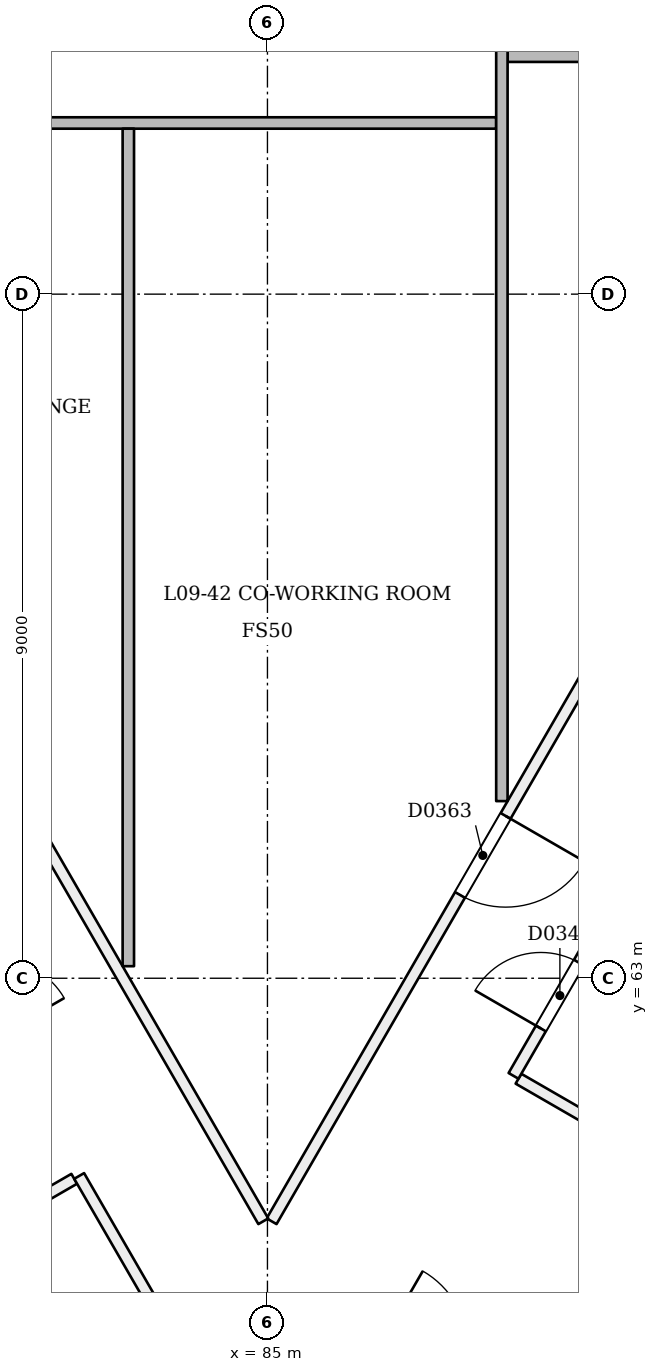
"""IFC4 building model, lengths in metres.
Left out: names, types, materials, properties, quantities, classifications, styles, units other than length and angle.
Written with IfcOpenShell. Run it as: python <this file> out.ifc"""

import sys

from ifc_helpers import new_model, si_unit, direction, frame, frame_2d, origin, place, context, subcontext, project, spatial, rectangle, extrude, element, fill, save


model = new_model("IFC4")
c1 = context("Model", 3, precision=1e-05, world=origin(), true_north=direction((0.0, 1.0)))
c2 = subcontext(c1, "Body", "Model", "MODEL_VIEW")
j1 = project(units=[si_unit("LENGTHUNIT", "METRE"), si_unit("PLANEANGLEUNIT", "RADIAN")], contexts=[c1])
p1 = place(None, origin())
s1 = spatial("IfcSite", under=j1, at=p1, CompositionType="ELEMENT")
p2 = place(p1, origin())
s2 = spatial("IfcBuilding", under=s1, at=p2, CompositionType="ELEMENT")
p3 = place(p2, frame((0.0, 0.0, 41.4)))
s3 = spatial("IfcBuildingStorey", under=s2, at=p3, CompositionType="ELEMENT", Elevation=41.4)
p4 = place(p3, frame((81.033, 59.539, 0.0), z_axis=(0.0, 0.0, 1.0), x_axis=(0.866052144996, 0.499953680002, 0.0)))
e1 = element("IfcWall", 1, at=p4, inside=s3, PredefinedType="PARTITIONING", context=c2, shape_type="SweptSolid", body=[
    extrude(rectangle(XDim=1.645, YDim=0.15, at=frame_2d((0.823, 0.0))), origin(), (0.0, 0.0, 1.0), 3.1),
])
p5 = place(p3, frame((82.523, 60.399, 0.0), z_axis=(0.0, 0.0, 1.0), x_axis=(0.500004234368, -0.866022959057, 0.0)))
e2 = element("IfcWall", 2, at=p5, inside=s3, PredefinedType="PARTITIONING", context=c2, shape_type="SweptSolid", body=[
    extrude(rectangle(XDim=2.5, YDim=0.15, at=frame_2d((1.25, 0.0))), origin(), (0.0, 0.0, 1.0), 3.1),
])
p6 = place(p3, frame((89.692, 60.876, 0.0), z_axis=(0.0, 0.0, 1.0), x_axis=(-0.866053882819, 0.499950669621, 0.0)))
e3 = element("IfcWall", 3, at=p6, inside=s3, PredefinedType="PARTITIONING", context=c2, shape_type="SweptSolid", body=[
    extrude(rectangle(XDim=1.605, YDim=0.15, at=frame_2d((0.803, 0.0))), origin(), (0.0, 0.0, 1.0), 3.1),
])
p7 = place(p3, frame((88.237, 61.716, 0.0), z_axis=(0.0, 0.0, 1.0), x_axis=(0.500002225217, 0.866024119051, 0.0)))
e4 = element("IfcWall", 4, at=p7, inside=s3, PredefinedType="PARTITIONING", context=c2, shape_type="SweptSolid", body=[
    extrude(rectangle(XDim=38.6, YDim=0.15, at=frame_2d((19.3, 0.0))), origin(), (0.0, 0.0, 1.0), 2.7),
])
p8 = place(p7, frame((0.72, 0.0, 0.0)))
e5 = element("IfcOpeningElement", 5, at=p8, cuts=e4, PredefinedType="OPENING", context=c2, shape_type="SweptSolid", body=[
    extrude(rectangle(XDim=1.0, YDim=2.1, at=frame_2d((0.5, 1.05))), frame((0.0, 0.085, 0.0), z_axis=(0.0, -1.0, 0.0), x_axis=(1.0, 0.0, 0.0)), (0.0, 0.0, 1.0), 0.171),
])
p9 = place(p7, frame((7.395, 0.0, 0.0)))
e6 = element("IfcOpeningElement", 6, at=p9, cuts=e4, PredefinedType="OPENING", context=c2, shape_type="SweptSolid", body=[
    extrude(rectangle(XDim=1.0, YDim=2.1, at=frame_2d((0.5, 1.05))), frame((0.0, 0.085, 0.0), z_axis=(0.0, -1.0, 0.0), x_axis=(1.0, 0.0, 0.0)), (0.0, 0.0, 1.0), 0.171),
])
p10 = place(p7, frame((9.605, 0.0, 0.0)))
e7 = element("IfcOpeningElement", 7, at=p10, cuts=e4, PredefinedType="OPENING", context=c2, shape_type="SweptSolid", body=[
    extrude(rectangle(XDim=1.0, YDim=2.1, at=frame_2d((0.5, 1.05))), frame((0.0, 0.085, 0.0), z_axis=(0.0, -1.0, 0.0), x_axis=(1.0, 0.0, 0.0)), (0.0, 0.0, 1.0), 0.171),
])
p11 = place(p7, frame((15.25, 0.0, 0.0)))
e8 = element("IfcOpeningElement", 8, at=p11, cuts=e4, PredefinedType="OPENING", context=c2, shape_type="SweptSolid", body=[
    extrude(rectangle(XDim=1.0, YDim=2.1, at=frame_2d((0.5, 1.05))), frame((0.0, 0.085, 0.0), z_axis=(0.0, -1.0, 0.0), x_axis=(1.0, 0.0, 0.0)), (0.0, 0.0, 1.0), 0.171),
])
p12 = place(p7, frame((18.605, 0.0, 0.0)))
e9 = element("IfcOpeningElement", 9, at=p12, cuts=e4, PredefinedType="OPENING", context=c2, shape_type="SweptSolid", body=[
    extrude(rectangle(XDim=1.0, YDim=2.1, at=frame_2d((0.5, 1.05))), frame((0.0, 0.085, 0.0), z_axis=(0.0, -1.0, 0.0), x_axis=(1.0, 0.0, 0.0)), (0.0, 0.0, 1.0), 0.171),
])
p13 = place(p7, frame((25.395, 0.0, 0.0)))
e10 = element("IfcOpeningElement", 10, at=p13, cuts=e4, PredefinedType="OPENING", context=c2, shape_type="SweptSolid", body=[
    extrude(rectangle(XDim=1.0, YDim=2.1, at=frame_2d((0.5, 1.05))), frame((0.0, 0.085, 0.0), z_axis=(0.0, -1.0, 0.0), x_axis=(1.0, 0.0, 0.0)), (0.0, 0.0, 1.0), 0.171),
])
p14 = place(p7, frame((29.8, 0.0, 0.0)))
e11 = element("IfcOpeningElement", 11, at=p14, cuts=e4, PredefinedType="OPENING", context=c2, shape_type="SweptSolid", body=[
    extrude(rectangle(XDim=1.2, YDim=2.1, at=frame_2d((0.6, 1.05))), frame((0.0, 0.085, 0.0), z_axis=(0.0, -1.0, 0.0), x_axis=(1.0, 0.0, 0.0)), (0.0, 0.0, 1.0), 0.171),
])
p15 = place(p7, frame((37.145, 0.0, 0.0)))
e12 = element("IfcOpeningElement", 12, at=p15, cuts=e4, PredefinedType="OPENING", context=c2, shape_type="SweptSolid", body=[
    extrude(rectangle(XDim=1.2, YDim=2.1, at=frame_2d((0.6, 1.05))), frame((0.0, 0.085, 0.0), z_axis=(0.0, -1.0, 0.0), x_axis=(1.0, 0.0, 0.0)), (0.0, 0.0, 1.0), 0.171),
])
p16 = place(p3, frame((102.835, 90.6, 0.0), z_axis=(0.0, 0.0, 1.0), x_axis=(-0.49999562485, -0.866027929764, 0.0)))
e13 = element("IfcWall", 13, at=p16, inside=s3, PredefinedType="PARTITIONING", context=c2, shape_type="SweptSolid", body=[
    extrude(rectangle(XDim=35.561, YDim=0.15, at=frame_2d((17.781, 0.0))), origin(), (0.0, 0.0, 1.0), 3.1),
])
p17 = place(p16, frame((14.506, 0.0, 0.0)))
e14 = element("IfcOpeningElement", 14, at=p17, cuts=e13, PredefinedType="OPENING", context=c2, shape_type="SweptSolid", body=[
    extrude(rectangle(XDim=1.2, YDim=2.1, at=frame_2d((0.6, 1.05))), frame((0.0, 0.085, 0.0), z_axis=(0.0, -1.0, 0.0), x_axis=(1.0, 0.0, 0.0)), (0.0, 0.0, 1.0), 0.171),
])
p18 = place(p16, frame((29.404, 0.0, 0.0)))
e15 = element("IfcOpeningElement", 15, at=p18, cuts=e13, PredefinedType="OPENING", context=c2, shape_type="SweptSolid", body=[
    extrude(rectangle(XDim=1.2, YDim=2.1, at=frame_2d((0.6, 1.05))), frame((0.0, 0.085, 0.0), z_axis=(0.0, -1.0, 0.0), x_axis=(1.0, 0.0, 0.0)), (0.0, 0.0, 1.0), 0.171),
])
p19 = place(p16, frame((4.779, 0.0, 0.0)))
e16 = element("IfcOpeningElement", 16, at=p19, cuts=e13, PredefinedType="OPENING", context=c2, shape_type="SweptSolid", body=[
    extrude(rectangle(XDim=1.0, YDim=2.1, at=frame_2d((0.5, 1.05))), frame((0.0, 0.085, 0.0), z_axis=(0.0, -1.0, 0.0), x_axis=(1.0, 0.0, 0.0)), (0.0, 0.0, 1.0), 0.171),
])
p20 = place(p16, frame((22.212, 0.0, 0.0)))
e17 = element("IfcOpeningElement", 17, at=p20, cuts=e13, PredefinedType="OPENING", context=c2, shape_type="SweptSolid", body=[
    extrude(rectangle(XDim=1.0, YDim=2.1, at=frame_2d((0.5, 1.05))), frame((0.0, 0.085, 0.0), z_axis=(0.0, -1.0, 0.0), x_axis=(1.0, 0.0, 0.0)), (0.0, 0.0, 1.0), 0.171),
])
p21 = place(p3, frame((84.945, 59.803, 0.0), z_axis=(0.0, 0.0, 1.0), x_axis=(-0.49999562485, 0.866027929764, 0.0)))
e18 = element("IfcWall", 18, at=p21, inside=s3, PredefinedType="PARTITIONING", context=c2, shape_type="SweptSolid", body=[
    extrude(rectangle(XDim=35.561, YDim=0.15, at=frame_2d((17.781, 0.0))), origin(), (0.0, 0.0, 1.0), 3.1),
])
p22 = place(p21, frame((17.406, 0.0, 0.0)))
e19 = element("IfcOpeningElement", 19, at=p22, cuts=e18, PredefinedType="OPENING", context=c2, shape_type="SweptSolid", body=[
    extrude(rectangle(XDim=1.2, YDim=2.1, at=frame_2d((0.6, 1.05))), frame((0.0, 0.085, 0.0), z_axis=(0.0, -1.0, 0.0), x_axis=(1.0, 0.0, 0.0)), (0.0, 0.0, 1.0), 0.171),
])
p23 = place(p21, frame((24.095, 0.0, 0.0)))
e20 = element("IfcOpeningElement", 20, at=p23, cuts=e18, PredefinedType="OPENING", context=c2, shape_type="SweptSolid", body=[
    extrude(rectangle(XDim=1.0, YDim=2.1, at=frame_2d((0.5, 1.05))), frame((0.0, 0.085, 0.0), z_axis=(0.0, -1.0, 0.0), x_axis=(1.0, 0.0, 0.0)), (0.0, 0.0, 1.0), 0.171),
])
p24 = place(p21, frame((10.613, 0.0, 0.0)))
e21 = element("IfcOpeningElement", 21, at=p24, cuts=e18, PredefinedType="OPENING", context=c2, shape_type="SweptSolid", body=[
    extrude(rectangle(XDim=1.2, YDim=2.1, at=frame_2d((0.6, 1.05))), frame((0.0, 0.085, 0.0), z_axis=(0.0, -1.0, 0.0), x_axis=(1.0, 0.0, 0.0)), (0.0, 0.0, 1.0), 0.171),
])
p25 = place(p21, frame((30.672, 0.0, 0.0)))
e22 = element("IfcOpeningElement", 22, at=p25, cuts=e18, PredefinedType="OPENING", context=c2, shape_type="SweptSolid", body=[
    extrude(rectangle(XDim=1.0, YDim=2.1, at=frame_2d((0.5, 1.05))), frame((0.0, 0.085, 0.0), z_axis=(0.0, -1.0, 0.0), x_axis=(1.0, 0.0, 0.0)), (0.0, 0.0, 1.0), 0.171),
])
p26 = place(p3, frame((76.733, 74.252, 0.0), z_axis=(0.0, 0.0, 1.0), x_axis=(1.0, 0.0, 0.0)))
e23 = element("IfcWall", 23, at=p26, inside=s3, PredefinedType="PARTITIONING", context=c2, shape_type="SweptSolid", body=[
    extrude(rectangle(XDim=11.276, YDim=0.15, at=frame_2d((5.638, 0.0))), origin(), (0.0, 0.0, 1.0), 3.1),
])
p27 = place(p3, frame((88.159, 75.13, 0.0), z_axis=(0.0, 0.0, 1.0), x_axis=(1.0, 0.0, 0.0)))
e24 = element("IfcWall", 24, at=p27, inside=s3, PredefinedType="PARTITIONING", context=c2, shape_type="SweptSolid", body=[
    extrude(rectangle(XDim=5.615, YDim=0.15, at=frame_2d((2.807, 0.0))), origin(), (0.0, 0.0, 1.0), 3.1),
])
p28 = place(p3, frame((83.17, 74.177, 0.0), z_axis=(0.0, 0.0, 1.0), x_axis=(0.0, -1.0, 0.0)))
e25 = element("IfcWall", 25, at=p28, inside=s3, PredefinedType="PARTITIONING", context=c2, shape_type="SweptSolid", body=[
    extrude(rectangle(XDim=11.018, YDim=0.15, at=frame_2d((5.509, 0.0))), origin(), (0.0, 0.0, 1.0), 3.1),
])
p29 = place(p3, frame((88.084, 65.33, 0.0), z_axis=(0.0, 0.0, 1.0), x_axis=(0.0, 1.0, 0.0)))
e26 = element("IfcWall", 26, at=p29, inside=s3, PredefinedType="PARTITIONING", context=c2, shape_type="SweptSolid", body=[
    extrude(rectangle(XDim=17.91, YDim=0.15, at=frame_2d((8.955, 0.0))), origin(), (0.0, 0.0, 1.0), 3.1),
])
p30 = place(p8, origin())
e27 = element("IfcDoor", 27, at=p30, inside=s3, OperationType="SINGLE_SWING_LEFT", PredefinedType="NOTDEFINED", context=c2, shape_type="SweptSolid", body=[
    extrude(rectangle(XDim=1.0, YDim=2.1, at=frame_2d((0.5, 1.05))), frame((0.0, 0.025, 0.0), z_axis=(0.0, -1.0, 0.0), x_axis=(1.0, 0.0, 0.0)), (0.0, 0.0, 1.0), 0.05),
])
fill(e5, e27)
p31 = place(p18, origin())
e28 = element("IfcDoor", 28, at=p31, inside=s3, OperationType="SINGLE_SWING_LEFT", PredefinedType="NOTDEFINED", context=c2, shape_type="SweptSolid", body=[
    extrude(rectangle(XDim=1.2, YDim=2.1, at=frame_2d((0.6, 1.05))), frame((0.0, 0.025, 0.0), z_axis=(0.0, -1.0, 0.0), x_axis=(1.0, 0.0, 0.0)), (0.0, 0.0, 1.0), 0.05),
])
fill(e15, e28)
save(model, sys.argv[1])
